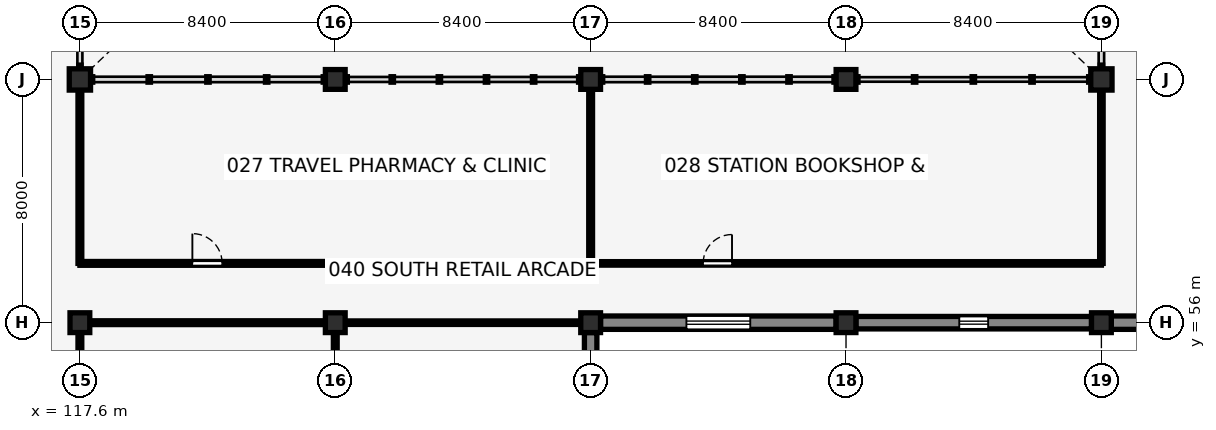
"""IFC4 building model, lengths in metres.
Left out: names, types, materials, properties, quantities, classifications, styles, units other than length and angle.
Written with IfcOpenShell. Run it as: python <this file> out.ifc"""

import sys

from ifc_helpers import new_model, si_unit, direction, frame, frame_2d, origin, origin_2d, place, context, subcontext, project, spatial, rectangle, circle, extrude, element, fill, save


model = new_model("IFC4")
c1 = context("Model", 3, precision=1e-05, world=origin(), true_north=direction((0.0, 1.0)))
c2 = subcontext(c1, "Body", "Model", "MODEL_VIEW")
j1 = project(units=[si_unit("LENGTHUNIT", "METRE"), si_unit("PLANEANGLEUNIT", "RADIAN")], contexts=[c1])
p1 = place(None, origin())
s1 = spatial("IfcSite", under=j1, at=p1, CompositionType="ELEMENT")
p2 = place(p1, origin())
s2 = spatial("IfcBuilding", under=s1, at=p2, CompositionType="ELEMENT")
p3 = place(p2, origin())
s3 = spatial("IfcBuildingStorey", under=s2, at=p3, CompositionType="ELEMENT", Elevation=0.0)
p4 = place(p3, frame((117.6, 56.0, 0.0), z_axis=(0.0, 0.0, 1.0), x_axis=(1.0, 0.0, 0.0)))
e1 = element("IfcColumn", 1, at=p4, inside=s3, PredefinedType="COLUMN", context=c2, shape_type="SweptSolid", body=[
    extrude(circle(Radius=0.325, at=origin_2d()), origin(), (0.0, 0.0, 1.0), 5.15),
])
p5 = place(p3, frame((117.6, 64.0, 0.0), z_axis=(0.0, 0.0, 1.0), x_axis=(1.0, 0.0, 0.0)))
e2 = element("IfcColumn", 2, at=p5, inside=s3, PredefinedType="COLUMN", context=c2, shape_type="SweptSolid", body=[
    extrude(rectangle(XDim=0.7, YDim=0.7, at=origin_2d()), origin(), (0.0, 0.0, 1.0), 5.15),
])
for number, where, z_axis, x_axis in (
    (3, (126.0, 56.0, 0.0), (0.0, 0.0, 1.0), (1.0, 0.0, 0.0)),
    (4, (126.0, 64.0, 0.0), (0.0, 0.0, 1.0), (1.0, 0.0, 0.0)),
    (5, (134.4, 56.0, 0.0), (0.0, 0.0, 1.0), (1.0, 0.0, 0.0)),
    (6, (134.4, 64.0, 0.0), (0.0, 0.0, 1.0), (1.0, 0.0, 0.0)),
    (7, (142.8, 56.0, 0.0), (0.0, 0.0, 1.0), (1.0, 0.0, 0.0)),
    (8, (142.8, 64.0, 0.0), (0.0, 0.0, 1.0), (1.0, 0.0, 0.0)),
):
    element("IfcColumn", number, at=place(p3, frame(where, z_axis=z_axis, x_axis=x_axis)), inside=s3, PredefinedType="COLUMN", context=c2, shape_type="SweptSolid", body=[
        extrude(circle(Radius=0.325, at=origin_2d()), origin(), (0.0, 0.0, 1.0), 5.15),
    ])
p6 = place(p3, frame((151.2, 56.0, 0.0), z_axis=(0.0, 0.0, 1.0), x_axis=(1.0, 0.0, 0.0)))
e9 = element("IfcColumn", 9, at=p6, inside=s3, PredefinedType="COLUMN", context=c2, shape_type="SweptSolid", body=[
    extrude(rectangle(XDim=0.65, YDim=0.65, at=origin_2d()), origin(), (0.0, 0.0, 1.0), 5.15),
])
p7 = place(p3, frame((151.2, 64.0, 0.0), z_axis=(0.0, 0.0, 1.0), x_axis=(1.0, 0.0, 0.0)))
e10 = element("IfcColumn", 10, at=p7, inside=s3, PredefinedType="COLUMN", context=c2, shape_type="SweptSolid", body=[
    extrude(rectangle(XDim=0.7, YDim=0.7, at=origin_2d()), origin(), (0.0, 0.0, 1.0), 5.15),
])
p8 = place(p3, frame((151.525, 56.0, 0.0), z_axis=(0.0, 0.0, 1.0), x_axis=(1.0, 0.0, 0.0)))
e11 = element("IfcWall", 11, at=p8, inside=s3, PredefinedType="SOLIDWALL", context=c2, shape_type="SweptSolid", body=[
    extrude(rectangle(XDim=7.75, YDim=0.44, at=frame_2d((3.875, 0.0))), origin(), (0.0, 0.0, 1.0), 4.74),
])
p9 = place(p8, frame((2.275, 0.0, 1.55), z_axis=(0.0, 0.0, 1.0), x_axis=(1.0, 0.0, 0.0)))
e12 = element("IfcOpeningElement", 12, at=p9, cuts=e11, PredefinedType="OPENING", context=c2, shape_type="SweptSolid", body=[
    extrude(rectangle(XDim=3.2, YDim=0.9, at=frame_2d((1.6, 0.45))), frame((0.0, 0.23, 0.0), z_axis=(0.0, -1.0, 0.0), x_axis=(1.0, 0.0, 0.0)), (0.0, 0.0, 1.0), 0.46),
])
p10 = place(p3, frame((134.725, 56.0, 0.0), z_axis=(0.0, 0.0, 1.0), x_axis=(1.0, 0.0, 0.0)))
e13 = element("IfcWall", 13, at=p10, inside=s3, PredefinedType="SOLIDWALL", context=c2, shape_type="SweptSolid", body=[
    extrude(rectangle(XDim=7.75, YDim=0.44, at=frame_2d((3.875, 0.0))), origin(), (0.0, 0.0, 1.0), 4.74),
])
p11 = place(p10, frame((2.825, 0.0, 1.55), z_axis=(0.0, 0.0, 1.0), x_axis=(1.0, 0.0, 0.0)))
e14 = element("IfcOpeningElement", 14, at=p11, cuts=e13, PredefinedType="OPENING", context=c2, shape_type="SweptSolid", body=[
    extrude(rectangle(XDim=2.1, YDim=0.8, at=frame_2d((1.05, 0.4))), frame((0.0, 0.23, 0.0), z_axis=(0.0, -1.0, 0.0), x_axis=(1.0, 0.0, 0.0)), (0.0, 0.0, 1.0), 0.46),
])
p12 = place(p3, frame((143.125, 56.0, 0.0), z_axis=(0.0, 0.0, 1.0), x_axis=(1.0, 0.0, 0.0)))
e15 = element("IfcWall", 15, at=p12, inside=s3, PredefinedType="SOLIDWALL", context=c2, shape_type="SweptSolid", body=[
    extrude(rectangle(XDim=7.75, YDim=0.41, at=frame_2d((3.875, 0.0))), origin(), (0.0, 0.0, 1.0), 4.74),
])
p13 = place(p12, frame((3.4, 0.0, 0.65), z_axis=(0.0, 0.0, 1.0), x_axis=(1.0, 0.0, 0.0)))
e16 = element("IfcOpeningElement", 16, at=p13, cuts=e15, PredefinedType="OPENING", context=c2, shape_type="SweptSolid", body=[
    extrude(rectangle(XDim=0.95, YDim=2.1, at=frame_2d((0.475, 1.05))), frame((0.0, 0.215, 0.0), z_axis=(0.0, -1.0, 0.0), x_axis=(1.0, 0.0, 0.0)), (0.0, 0.0, 1.0), 0.43),
])
p14 = place(p3, frame((134.4, 48.325, 0.0), z_axis=(0.0, 0.0, 1.0), x_axis=(0.0, 1.0, 0.0)))
e17 = element("IfcWall", 17, at=p14, inside=s3, PredefinedType="SOLIDWALL", context=c2, shape_type="SweptSolid", body=[
    extrude(rectangle(XDim=7.35, YDim=0.41, at=frame_2d((3.675, 0.0))), origin(), (0.0, 0.0, 1.0), 4.747),
])
p15 = place(p14, frame((3.075, 0.0, 1.55), z_axis=(0.0, 0.0, 1.0), x_axis=(1.0, 0.0, 0.0)))
e18 = element("IfcOpeningElement", 18, at=p15, cuts=e17, PredefinedType="OPENING", context=c2, shape_type="SweptSolid", body=[
    extrude(rectangle(XDim=1.2, YDim=0.95, at=frame_2d((0.6, 0.475))), frame((0.0, 0.215, 0.0), z_axis=(0.0, -1.0, 0.0), x_axis=(1.0, 0.0, 0.0)), (0.0, 0.0, 1.0), 0.43),
])
p16 = place(p3, frame((117.6, 57.95, 0.0), z_axis=(0.0, 0.0, 1.0), x_axis=(1.0, 0.0, 0.0)))
e19 = element("IfcWall", 19, at=p16, inside=s3, PredefinedType="PARTITIONING", context=c2, shape_type="SweptSolid", body=[
    extrude(rectangle(XDim=16.8, YDim=0.125, at=frame_2d((8.4, 0.0))), origin(), (0.0, 0.0, 1.0), 5.15),
])
p17 = place(p16, frame((3.7, 0.0, 0.0), z_axis=(0.0, 0.0, 1.0), x_axis=(1.0, 0.0, 0.0)))
e20 = element("IfcOpeningElement", 20, at=p17, cuts=e19, PredefinedType="OPENING", context=c2, shape_type="SweptSolid", body=[
    extrude(rectangle(XDim=0.98, YDim=2.15, at=frame_2d((0.49, 1.075))), frame((0.0, 0.073, 0.0), z_axis=(0.0, -1.0, 0.0), x_axis=(1.0, 0.0, 0.0)), (0.0, 0.0, 1.0), 0.145),
])
p18 = place(p3, frame((134.4, 57.95, 0.0), z_axis=(0.0, 0.0, 1.0), x_axis=(1.0, 0.0, 0.0)))
e21 = element("IfcWall", 21, at=p18, inside=s3, PredefinedType="PARTITIONING", context=c2, shape_type="SweptSolid", body=[
    extrude(rectangle(XDim=16.8, YDim=0.115, at=frame_2d((8.4, 0.0))), origin(), (0.0, 0.0, 1.0), 4.542),
])
p19 = place(p18, frame((3.7, 0.0, 0.0), z_axis=(0.0, 0.0, 1.0), x_axis=(1.0, 0.0, 0.0)))
e22 = element("IfcOpeningElement", 22, at=p19, cuts=e21, PredefinedType="OPENING", context=c2, shape_type="SweptSolid", body=[
    extrude(rectangle(XDim=0.95, YDim=2.15, at=frame_2d((0.475, 1.075))), frame((0.0, 0.067, 0.0), z_axis=(0.0, -1.0, 0.0), x_axis=(1.0, 0.0, 0.0)), (0.0, 0.0, 1.0), 0.135),
])
p20 = place(p3, frame((117.915, 56.0, 0.0), z_axis=(0.0, 0.0, 1.0), x_axis=(1.0, 0.0, 0.0)))
e23 = element("IfcWall", 23, at=p20, inside=s3, PredefinedType="PARTITIONING", context=c2, shape_type="SweptSolid", body=[
    extrude(rectangle(XDim=7.77, YDim=0.125, at=frame_2d((3.885, 0.0))), origin(), (0.0, 0.0, 1.0), 4.605),
])
for number, where, z_axis, x_axis in (
    (24, (117.6, 50.2, 0.0), (0.0, 0.0, 1.0), (0.0, 1.0, 0.0)),
    (25, (126.0, 50.2, 0.0), (0.0, 0.0, 1.0), (0.0, 1.0, 0.0)),
):
    element("IfcWall", number, at=place(p3, frame(where, z_axis=z_axis, x_axis=x_axis)), inside=s3, PredefinedType="PARTITIONING", context=c2, shape_type="SweptSolid", body=[
        extrude(rectangle(XDim=5.485, YDim=0.125, at=frame_2d((2.743, 0.0))), origin(), (0.0, 0.0, 1.0), 4.542),
    ])
p21 = place(p3, frame((126.315, 56.0, 0.0), z_axis=(0.0, 0.0, 1.0), x_axis=(1.0, 0.0, 0.0)))
e26 = element("IfcWall", 26, at=p21, inside=s3, PredefinedType="PARTITIONING", context=c2, shape_type="SweptSolid", body=[
    extrude(rectangle(XDim=7.77, YDim=0.115, at=frame_2d((3.885, 0.0))), origin(), (0.0, 0.0, 1.0), 4.605),
])
p22 = place(p3, frame((117.6, 57.95, 0.0), z_axis=(0.0, 0.0, 1.0), x_axis=(0.0, 1.0, 0.0)))
e27 = element("IfcWall", 27, at=p22, inside=s3, PredefinedType="PARTITIONING", context=c2, shape_type="SweptSolid", body=[
    extrude(rectangle(XDim=5.71, YDim=0.125, at=frame_2d((2.855, 0.0))), origin(), (0.0, 0.0, 1.0), 4.542),
])
p23 = place(p3, frame((134.4, 57.95, 0.0), z_axis=(0.0, 0.0, 1.0), x_axis=(0.0, 1.0, 0.0)))
e28 = element("IfcWall", 28, at=p23, inside=s3, PredefinedType="PARTITIONING", context=c2, shape_type="SweptSolid", body=[
    extrude(rectangle(XDim=5.735, YDim=0.125, at=frame_2d((2.868, 0.0))), origin(), (0.0, 0.0, 1.0), 4.542),
])
p24 = place(p3, frame((151.2, 57.95, 0.0), z_axis=(0.0, 0.0, 1.0), x_axis=(0.0, 1.0, 0.0)))
e29 = element("IfcWall", 29, at=p24, inside=s3, PredefinedType="PARTITIONING", context=c2, shape_type="SweptSolid", body=[
    extrude(rectangle(XDim=5.71, YDim=0.115, at=frame_2d((2.855, 0.0))), origin(), (0.0, 0.0, 1.0), 4.542),
])
p25 = place(p11, origin())
e30 = element("IfcWindow", 30, at=p25, inside=s3, PartitioningType="DOUBLE_PANEL_HORIZONTAL", PredefinedType="WINDOW", context=c2, shape_type="SweptSolid", body=[
    extrude(rectangle(XDim=2.1, YDim=0.8, at=frame_2d((1.05, 0.4))), frame((0.0, 0.03, 0.0), z_axis=(0.0, -1.0, 0.0), x_axis=(1.0, 0.0, 0.0)), (0.0, 0.0, 1.0), 0.06),
])
fill(e14, e30)
p26 = place(p13, origin())
e31 = element("IfcWindow", 31, at=p26, inside=s3, PartitioningType="SINGLE_PANEL", PredefinedType="WINDOW", context=c2, shape_type="SweptSolid", body=[
    extrude(rectangle(XDim=0.95, YDim=2.1, at=frame_2d((0.475, 1.05))), frame((0.0, 0.03, 0.0), z_axis=(0.0, -1.0, 0.0), x_axis=(1.0, 0.0, 0.0)), (0.0, 0.0, 1.0), 0.06),
])
fill(e16, e31)
p27 = place(p17, origin())
e32 = element("IfcDoor", 32, at=p27, inside=s3, OperationType="SINGLE_SWING_LEFT", PredefinedType="DOOR", context=c2, shape_type="SweptSolid", body=[
    extrude(rectangle(XDim=0.98, YDim=2.15, at=frame_2d((0.49, 1.075))), frame((0.0, 0.025, 0.0), z_axis=(0.0, -1.0, 0.0), x_axis=(1.0, 0.0, 0.0)), (0.0, 0.0, 1.0), 0.05),
])
fill(e20, e32)
p28 = place(p19, origin())
e33 = element("IfcDoor", 33, at=p28, inside=s3, OperationType="SINGLE_SWING_RIGHT", PredefinedType="DOOR", context=c2, shape_type="SweptSolid", body=[
    extrude(rectangle(XDim=0.95, YDim=2.15, at=frame_2d((0.475, 1.075))), frame((0.0, 0.025, 0.0), z_axis=(0.0, -1.0, 0.0), x_axis=(1.0, 0.0, 0.0)), (0.0, 0.0, 1.0), 0.05),
])
fill(e22, e33)
save(model, sys.argv[1])
